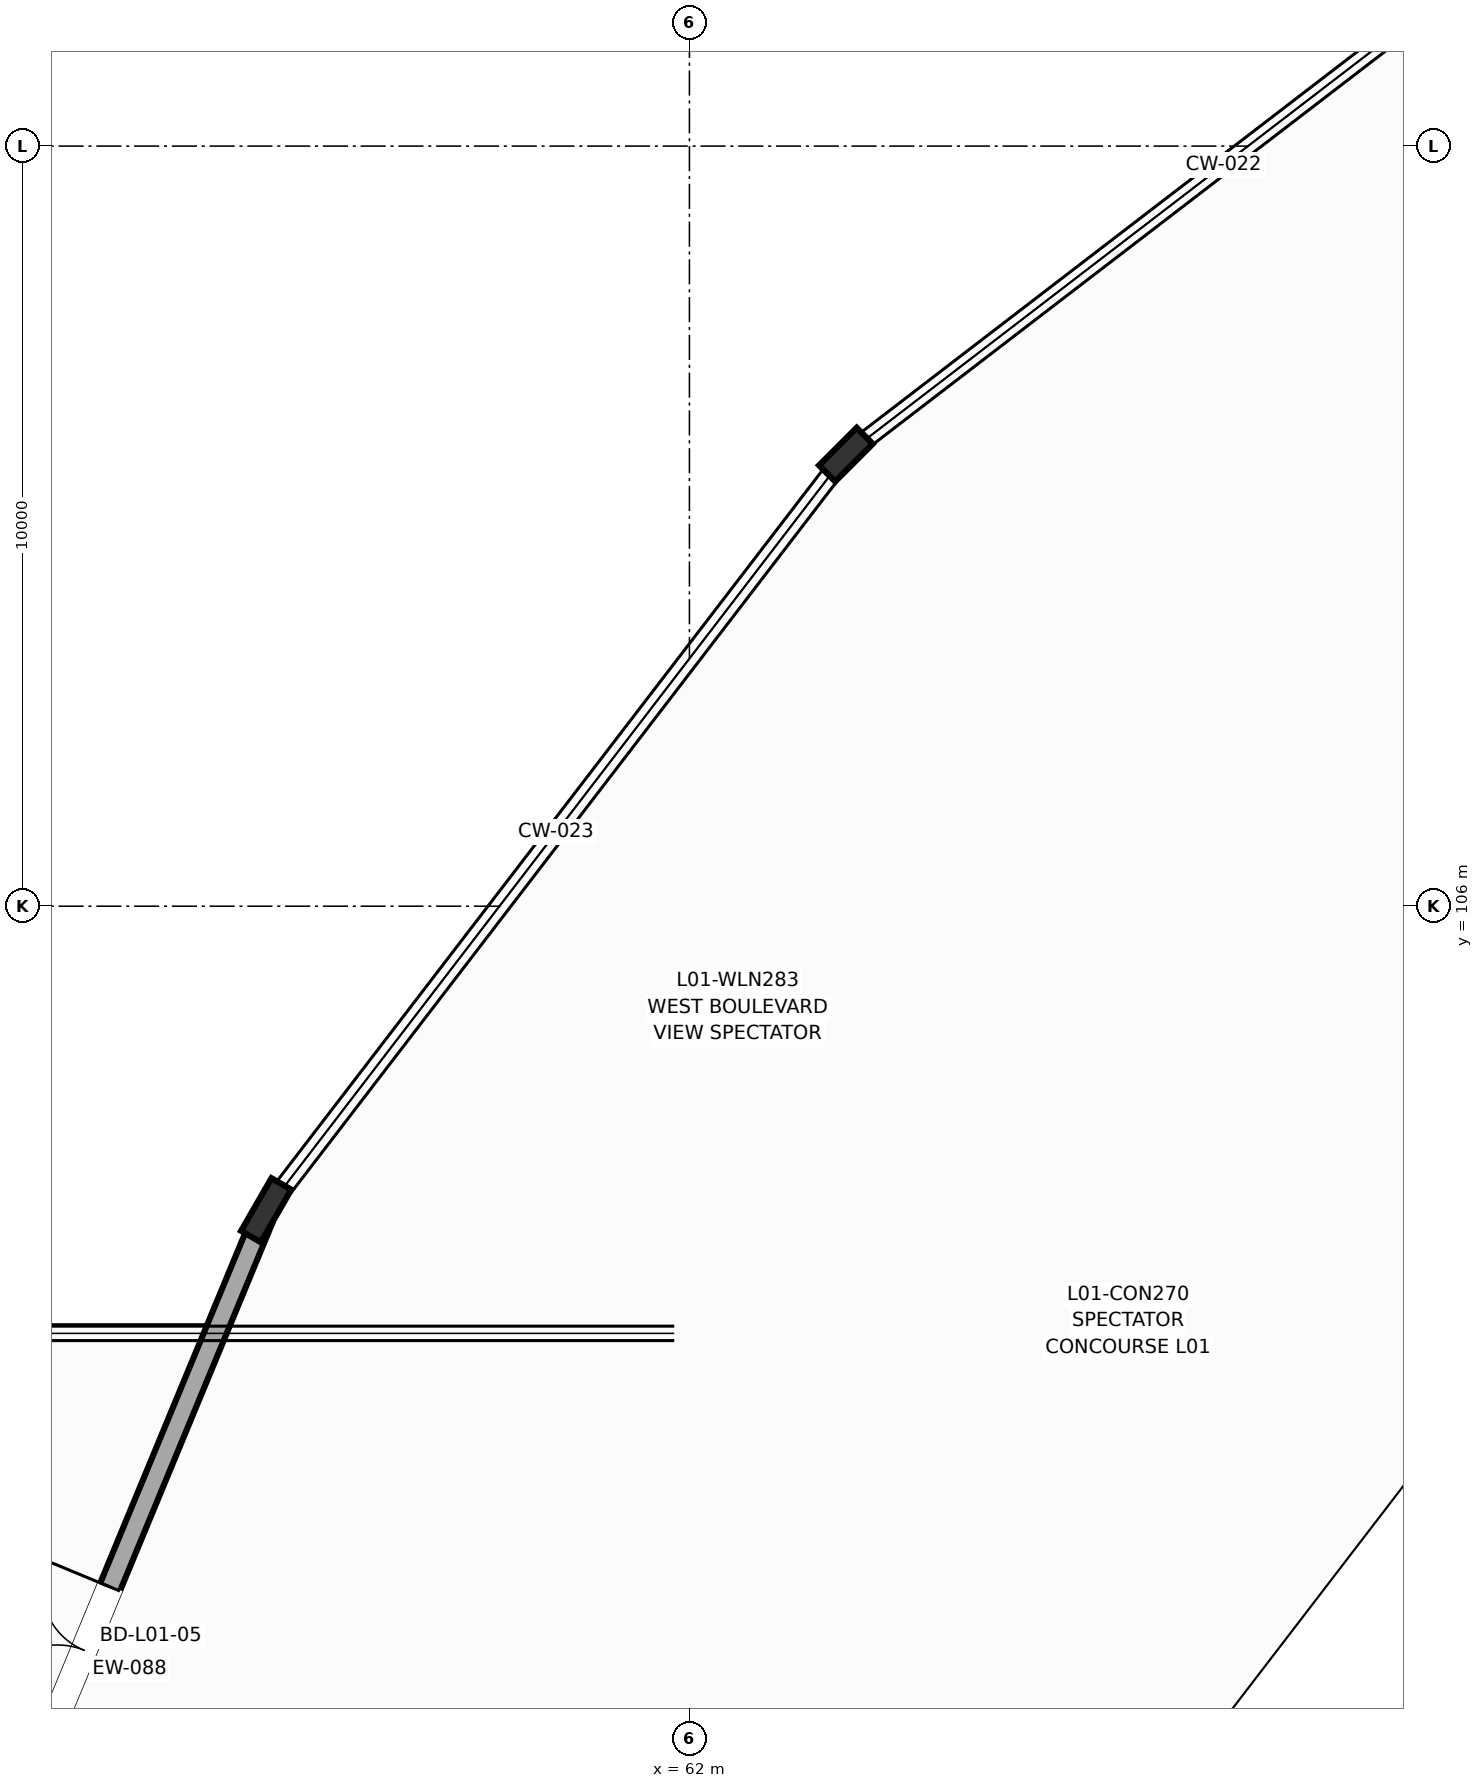
"""IFC4 building model, lengths in metres.
Left out: names, types, materials, properties, quantities, classifications, styles, units other than length and angle.
Written with IfcOpenShell. Run it as: python <this file> out.ifc"""

import sys

from ifc_helpers import new_model, si_unit, direction, frame, frame_2d, origin, origin_2d, place, context, subcontext, project, spatial, rectangle, i_section, extrude, element, fill, save


model = new_model("IFC4")
c1 = context("Model", 3, precision=1e-05, world=origin(), true_north=direction((0.0, 1.0)))
c2 = subcontext(c1, "Body", "Model", "MODEL_VIEW")
j1 = project(units=[si_unit("LENGTHUNIT", "METRE"), si_unit("PLANEANGLEUNIT", "RADIAN")], contexts=[c1])
p1 = place(None, origin())
s1 = spatial("IfcSite", under=j1, at=p1, CompositionType="ELEMENT")
p2 = place(p1, origin())
s2 = spatial("IfcBuilding", under=s1, at=p2, CompositionType="ELEMENT")
p3 = place(p2, frame((0.0, 0.0, 4.5)))
s3 = spatial("IfcBuildingStorey", under=s2, at=p3, CompositionType="ELEMENT", Elevation=4.5)
p4 = place(p3, frame((64.059, 111.941, 0.0), z_axis=(0.0, 0.0, 1.0), x_axis=(-0.707106781187, 0.707106781187, 0.0)))
e1 = element("IfcColumn", 1, at=p4, inside=s3, PredefinedType="COLUMN", context=c2, shape_type="SweptSolid", body=[
    extrude(i_section(OverallWidth=0.3, OverallDepth=0.7, WebThickness=0.017, FlangeThickness=0.032, at=origin_2d()), origin(), (0.0, 0.0, 1.0), 4.5),
])
p5 = place(p3, frame((56.431, 102.0, 0.0), z_axis=(0.0, 0.0, 1.0), x_axis=(-0.866025403784, 0.5, 0.0)))
e2 = element("IfcColumn", 2, at=p5, inside=s3, PredefinedType="COLUMN", context=c2, shape_type="SweptSolid", body=[
    extrude(i_section(OverallWidth=0.3, OverallDepth=0.8, WebThickness=0.018, FlangeThickness=0.033, at=origin_2d()), origin(), (0.0, 0.0, 1.0), 4.5),
])
p6 = place(p3, frame((56.381, 101.88, 0.0), z_axis=(0.0, 0.0, 1.0), x_axis=(-0.382625334652, -0.923903595232, 0.0)))
e3 = element("IfcWall", 3, at=p6, inside=s3, PredefinedType="SOLIDWALL", context=c2, shape_type="SweptSolid", body=[
    extrude(rectangle(XDim=12.271, YDim=0.28, at=frame_2d((6.135, 0.0))), origin(), (0.0, 0.0, 1.0), 3.1),
])
p7 = place(p6, frame((5.235, 0.0, 0.0)))
e4 = element("IfcOpeningElement", 4, at=p7, cuts=e3, PredefinedType="OPENING", context=c2, shape_type="SweptSolid", body=[
    extrude(rectangle(XDim=1.8, YDim=2.35, at=frame_2d((0.9, 1.175))), frame((0.0, 0.15, 0.0), z_axis=(0.0, -1.0, 0.0), x_axis=(1.0, 0.0, 0.0)), (0.0, 0.0, 1.0), 0.3),
])
p8 = place(p3, frame((75.812, 99.571, 0.0), z_axis=(0.0, 0.0, 1.0), x_axis=(-0.608807390719, -0.793318070515, 0.0)))
e5 = element("IfcWall", 5, at=p8, inside=s3, PredefinedType="SOLIDWALL", context=c2, shape_type="SweptSolid", body=[
    extrude(rectangle(XDim=7.213, YDim=0.37, at=frame_2d((3.606, 0.0))), origin(), (0.0, 0.0, 1.0), 3.3),
])
p9 = place(p7, frame((1.8, 0.0, 0.0), z_axis=(0.0, 0.0, 1.0), x_axis=(-1.0, 0.0, 0.0)))
e6 = element("IfcDoor", 6, at=p9, inside=s3, OperationType="DOUBLE_DOOR_SINGLE_SWING", PredefinedType="DOOR", context=c2, shape_type="SweptSolid", body=[
    extrude(rectangle(XDim=1.8, YDim=2.35, at=frame_2d((0.9, 1.175))), frame((0.0, 0.025, 0.0), z_axis=(0.0, -1.0, 0.0), x_axis=(1.0, 0.0, 0.0)), (0.0, 0.0, 1.0), 0.05),
])
fill(e4, e6)
save(model, sys.argv[1])
